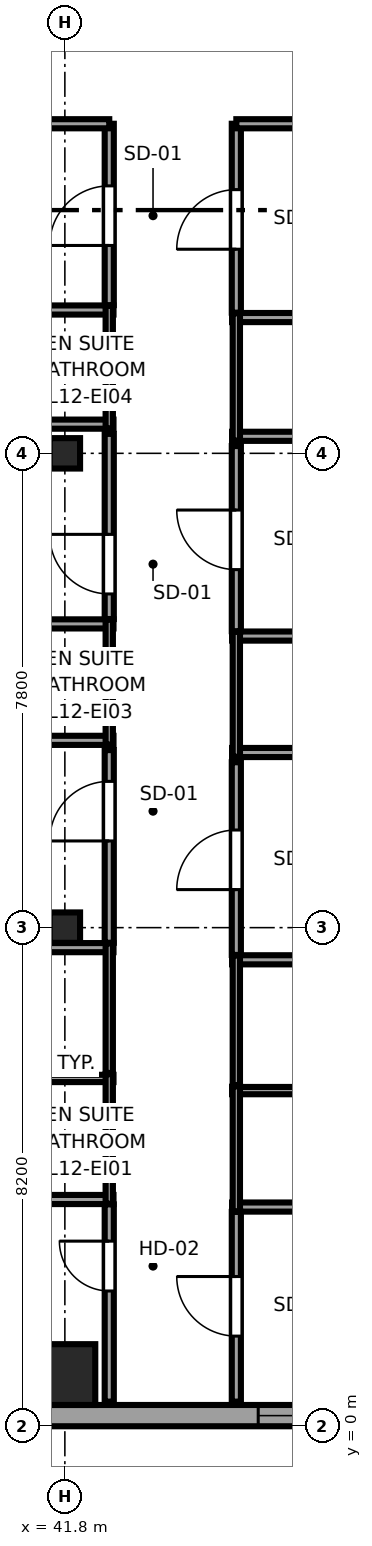
"""IFC4 building model, lengths in metres.
Left out: names, types, materials, properties, quantities, classifications, styles, units other than length and angle.
Written with IfcOpenShell. Run it as: python <this file> out.ifc"""

import sys

from ifc_helpers import new_model, si_unit, direction, frame, frame_2d, origin, origin_2d, place, context, subcontext, project, spatial, rectangle, i_section, extrude, source, transform, mapped, element, fill, save


model = new_model("IFC4")
c1 = context("Model", 3, precision=1e-05, world=origin(), true_north=direction((0.0, 1.0)))
c2 = subcontext(c1, "Body", "Model", "MODEL_VIEW")
j1 = project(units=[si_unit("LENGTHUNIT", "METRE"), si_unit("PLANEANGLEUNIT", "RADIAN")], contexts=[c1])
p1 = place(None, origin())
s1 = spatial("IfcSite", under=j1, at=p1, CompositionType="ELEMENT")
p2 = place(p1, origin())
s2 = spatial("IfcBuilding", under=s1, at=p2, CompositionType="ELEMENT")
p3 = place(p2, frame((0.0, 0.0, 53.3)))
s3 = spatial("IfcBuildingStorey", under=s2, at=p3, CompositionType="ELEMENT", Elevation=53.3)
m1 = source(origin(), c2, "Body", "SweptSolid", [
    extrude(rectangle(XDim=1.0, YDim=1.0, at=origin_2d()), origin(), (0.0, 0.0, 1.0), 3.55),
])
p4 = place(p3, frame((41.8, 0.85, 0.0), z_axis=(0.0, 0.0, 1.0), x_axis=(1.0, 0.0, 0.0)))
e1 = element("IfcColumn", 1, at=p4, inside=s3, PredefinedType="COLUMN", context=c2, shape_type="MappedRepresentation", body=[
    mapped(m1, transform((0.0, 0.0, 0.0), x_axis=(1.0, 0.0, 0.0), y_axis=(0.0, 1.0, 0.0), z_axis=(0.0, 0.0, 1.0), scale=1.0)),
])
m2 = source(origin(), c2, "Body", "SweptSolid", [
    extrude(i_section(OverallWidth=0.5, OverallDepth=0.5, WebThickness=0.028, FlangeThickness=0.045, at=origin_2d()), origin(), (0.0, 0.0, 1.0), 3.55),
])
for number, where, z_axis, x_axis in (
    (2, (41.8, 8.2, 0.0), (0.0, 0.0, 1.0), (1.0, 0.0, 0.0)),
    (3, (41.8, 16.0, 0.0), (0.0, 0.0, 1.0), (1.0, 0.0, 0.0)),
):
    element("IfcColumn", number, at=place(p3, frame(where, z_axis=z_axis, x_axis=x_axis)), inside=s3, PredefinedType="COLUMN", context=c2, shape_type="MappedRepresentation", body=[
        mapped(m2, transform((0.0, 0.0, 0.0), x_axis=(1.0, 0.0, 0.0), y_axis=(0.0, 1.0, 0.0), z_axis=(0.0, 0.0, 1.0), scale=1.0)),
    ])
p5 = place(p3, frame((34.375, 0.175, 0.0), z_axis=(0.0, 0.0, 1.0), x_axis=(1.0, 0.0, 0.0)))
e4 = element("IfcWall", 4, at=p5, inside=s3, PredefinedType="SOLIDWALL", context=c2, shape_type="SweptSolid", body=[
    extrude(rectangle(XDim=18.008, YDim=0.35, at=frame_2d((9.004, 0.0))), origin(), (0.0, 0.0, 1.0), 3.37),
])
p6 = place(p5, frame((1.651, 0.0, 0.68)))
e5 = element("IfcOpeningElement", 5, at=p6, cuts=e4, PredefinedType="OPENING", context=c2, shape_type="SweptSolid", body=[
    extrude(rectangle(XDim=2.1, YDim=1.9, at=frame_2d((1.05, 0.95))), frame((0.0, 0.185, 0.0), z_axis=(0.0, -1.0, 0.0), x_axis=(1.0, 0.0, 0.0)), (0.0, 0.0, 1.0), 0.37),
])
p7 = place(p5, frame((10.605, 0.0, 0.68)))
e6 = element("IfcOpeningElement", 6, at=p7, cuts=e4, PredefinedType="OPENING", context=c2, shape_type="SweptSolid", body=[
    extrude(rectangle(XDim=2.1, YDim=1.9, at=frame_2d((1.05, 0.95))), frame((0.0, 0.185, 0.0), z_axis=(0.0, -1.0, 0.0), x_axis=(1.0, 0.0, 0.0)), (0.0, 0.0, 1.0), 0.37),
])
p8 = place(p3, frame((40.01, 3.729, 0.0), z_axis=(0.0, 0.0, 1.0), x_axis=(1.0, 0.0, 0.0)))
e7 = element("IfcWall", 7, at=p8, inside=s3, PredefinedType="PARTITIONING", context=c2, shape_type="SweptSolid", body=[
    extrude(rectangle(XDim=2.59, YDim=0.15, at=frame_2d((1.295, 0.0))), origin(), (0.0, 0.0, 1.0), 3.37),
])
p9 = place(p3, frame((40.01, 5.72, 0.0), z_axis=(0.0, 0.0, 1.0), x_axis=(1.0, 0.0, 0.0)))
e8 = element("IfcWall", 8, at=p9, inside=s3, PredefinedType="PLUMBINGWALL", context=c2, shape_type="SweptSolid", body=[
    extrude(rectangle(XDim=2.59, YDim=0.12, at=frame_2d((1.295, 0.0))), origin(), (0.0, 0.0, 1.0), 3.37),
])
p10 = place(p3, frame((42.53, 3.659, 0.0), z_axis=(0.0, 0.0, 1.0), x_axis=(0.0, 1.0, 0.0)))
e9 = element("IfcWall", 9, at=p10, inside=s3, PredefinedType="PLUMBINGWALL", context=c2, shape_type="SweptSolid", body=[
    extrude(rectangle(XDim=2.131, YDim=0.12, at=frame_2d((1.065, 0.0))), origin(), (0.0, 0.0, 1.0), 3.37),
])
p11 = place(p3, frame((40.01, 7.871, 0.0), z_axis=(0.0, 0.0, 1.0), x_axis=(1.0, 0.0, 0.0)))
e10 = element("IfcWall", 10, at=p11, inside=s3, PredefinedType="PARTITIONING", context=c2, shape_type="SweptSolid", body=[
    extrude(rectangle(XDim=2.59, YDim=0.15, at=frame_2d((1.295, 0.0))), origin(), (0.0, 0.0, 1.0), 3.37),
])
p12 = place(p3, frame((42.53, 5.81, 0.0), z_axis=(0.0, 0.0, 1.0), x_axis=(0.0, 1.0, 0.0)))
e11 = element("IfcWall", 11, at=p12, inside=s3, PredefinedType="PLUMBINGWALL", context=c2, shape_type="SweptSolid", body=[
    extrude(rectangle(XDim=2.131, YDim=0.12, at=frame_2d((1.065, 0.0))), origin(), (0.0, 0.0, 1.0), 3.37),
])
p13 = place(p3, frame((34.65, 11.28, 0.0), z_axis=(0.0, 0.0, 1.0), x_axis=(1.0, 0.0, 0.0)))
e12 = element("IfcWall", 12, at=p13, inside=s3, PredefinedType="PARTITIONING", context=c2, shape_type="SweptSolid", body=[
    extrude(rectangle(XDim=7.95, YDim=0.15, at=frame_2d((3.975, 0.0))), origin(), (0.0, 0.0, 1.0), 3.37),
])
p14 = place(p3, frame((40.01, 13.195, 0.0), z_axis=(0.0, 0.0, 1.0), x_axis=(1.0, 0.0, 0.0)))
e13 = element("IfcWall", 13, at=p14, inside=s3, PredefinedType="PARTITIONING", context=c2, shape_type="SweptSolid", body=[
    extrude(rectangle(XDim=2.59, YDim=0.15, at=frame_2d((1.295, 0.0))), origin(), (0.0, 0.0, 1.0), 3.37),
])
p15 = place(p3, frame((42.53, 11.21, 0.0), z_axis=(0.0, 0.0, 1.0), x_axis=(0.0, 1.0, 0.0)))
e14 = element("IfcWall", 14, at=p15, inside=s3, PredefinedType="PLUMBINGWALL", context=c2, shape_type="SweptSolid", body=[
    extrude(rectangle(XDim=2.055, YDim=0.12, at=frame_2d((1.027, 0.0))), origin(), (0.0, 0.0, 1.0), 3.37),
])
p16 = place(p3, frame((34.65, 16.48, 0.0), z_axis=(0.0, 0.0, 1.0), x_axis=(1.0, 0.0, 0.0)))
e15 = element("IfcWall", 15, at=p16, inside=s3, PredefinedType="PARTITIONING", context=c2, shape_type="SweptSolid", body=[
    extrude(rectangle(XDim=7.95, YDim=0.15, at=frame_2d((3.975, 0.0))), origin(), (0.0, 0.0, 1.0), 3.37),
])
p17 = place(p3, frame((40.01, 18.357, 0.0), z_axis=(0.0, 0.0, 1.0), x_axis=(1.0, 0.0, 0.0)))
e16 = element("IfcWall", 16, at=p17, inside=s3, PredefinedType="PARTITIONING", context=c2, shape_type="SweptSolid", body=[
    extrude(rectangle(XDim=2.59, YDim=0.15, at=frame_2d((1.295, 0.0))), origin(), (0.0, 0.0, 1.0), 3.37),
])
p18 = place(p3, frame((42.53, 16.41, 0.0), z_axis=(0.0, 0.0, 1.0), x_axis=(0.0, 1.0, 0.0)))
e17 = element("IfcWall", 17, at=p18, inside=s3, PredefinedType="PLUMBINGWALL", context=c2, shape_type="SweptSolid", body=[
    extrude(rectangle(XDim=2.017, YDim=0.12, at=frame_2d((1.009, 0.0))), origin(), (0.0, 0.0, 1.0), 3.37),
])
p19 = place(p3, frame((44.55, 3.605, 0.0), z_axis=(0.0, 0.0, 1.0), x_axis=(1.0, 0.0, 0.0)))
e18 = element("IfcWall", 18, at=p19, inside=s3, PredefinedType="PARTITIONING", context=c2, shape_type="SweptSolid", body=[
    extrude(rectangle(XDim=2.59, YDim=0.15, at=frame_2d((1.295, 0.0))), origin(), (0.0, 0.0, 1.0), 3.37),
])
p20 = place(p3, frame((44.55, 5.52, 0.0), z_axis=(0.0, 0.0, 1.0), x_axis=(1.0, 0.0, 0.0)))
e19 = element("IfcWall", 19, at=p20, inside=s3, PredefinedType="PLUMBINGWALL", context=c2, shape_type="SweptSolid", body=[
    extrude(rectangle(XDim=2.59, YDim=0.12, at=frame_2d((1.295, 0.0))), origin(), (0.0, 0.0, 1.0), 3.37),
])
p21 = place(p3, frame((44.62, 3.535, 0.0), z_axis=(0.0, 0.0, 1.0), x_axis=(0.0, 1.0, 0.0)))
e20 = element("IfcWall", 20, at=p21, inside=s3, PredefinedType="PLUMBINGWALL", context=c2, shape_type="SweptSolid", body=[
    extrude(rectangle(XDim=2.055, YDim=0.12, at=frame_2d((1.028, 0.0))), origin(), (0.0, 0.0, 1.0), 3.37),
])
p22 = place(p3, frame((44.55, 7.671, 0.0), z_axis=(0.0, 0.0, 1.0), x_axis=(1.0, 0.0, 0.0)))
e21 = element("IfcWall", 21, at=p22, inside=s3, PredefinedType="PARTITIONING", context=c2, shape_type="SweptSolid", body=[
    extrude(rectangle(XDim=2.59, YDim=0.15, at=frame_2d((1.295, 0.0))), origin(), (0.0, 0.0, 1.0), 3.37),
])
p23 = place(p3, frame((44.62, 5.61, 0.0), z_axis=(0.0, 0.0, 1.0), x_axis=(0.0, 1.0, 0.0)))
e22 = element("IfcWall", 22, at=p23, inside=s3, PredefinedType="PLUMBINGWALL", context=c2, shape_type="SweptSolid", body=[
    extrude(rectangle(XDim=2.131, YDim=0.12, at=frame_2d((1.065, 0.0))), origin(), (0.0, 0.0, 1.0), 3.37),
])
p24 = place(p3, frame((44.55, 11.08, 0.0), z_axis=(0.0, 0.0, 1.0), x_axis=(1.0, 0.0, 0.0)))
e23 = element("IfcWall", 23, at=p24, inside=s3, PredefinedType="PARTITIONING", context=c2, shape_type="SweptSolid", body=[
    extrude(rectangle(XDim=12.045, YDim=0.15, at=frame_2d((6.022, 0.0))), origin(), (0.0, 0.0, 1.0), 3.37),
])
p25 = place(p3, frame((44.55, 12.995, 0.0), z_axis=(0.0, 0.0, 1.0), x_axis=(1.0, 0.0, 0.0)))
e24 = element("IfcWall", 24, at=p25, inside=s3, PredefinedType="PARTITIONING", context=c2, shape_type="SweptSolid", body=[
    extrude(rectangle(XDim=2.59, YDim=0.15, at=frame_2d((1.295, 0.0))), origin(), (0.0, 0.0, 1.0), 3.37),
])
p26 = place(p3, frame((44.62, 11.01, 0.0), z_axis=(0.0, 0.0, 1.0), x_axis=(0.0, 1.0, 0.0)))
e25 = element("IfcWall", 25, at=p26, inside=s3, PredefinedType="PLUMBINGWALL", context=c2, shape_type="SweptSolid", body=[
    extrude(rectangle(XDim=2.055, YDim=0.12, at=frame_2d((1.027, 0.0))), origin(), (0.0, 0.0, 1.0), 3.37),
])
p27 = place(p3, frame((44.55, 16.28, 0.0), z_axis=(0.0, 0.0, 1.0), x_axis=(1.0, 0.0, 0.0)))
e26 = element("IfcWall", 26, at=p27, inside=s3, PredefinedType="PARTITIONING", context=c2, shape_type="SweptSolid", body=[
    extrude(rectangle(XDim=12.045, YDim=0.15, at=frame_2d((6.022, 0.0))), origin(), (0.0, 0.0, 1.0), 3.37),
])
p28 = place(p3, frame((44.55, 18.233, 0.0), z_axis=(0.0, 0.0, 1.0), x_axis=(1.0, 0.0, 0.0)))
e27 = element("IfcWall", 27, at=p28, inside=s3, PredefinedType="PARTITIONING", context=c2, shape_type="SweptSolid", body=[
    extrude(rectangle(XDim=2.59, YDim=0.15, at=frame_2d((1.295, 0.0))), origin(), (0.0, 0.0, 1.0), 3.37),
])
p29 = place(p3, frame((44.62, 16.21, 0.0), z_axis=(0.0, 0.0, 1.0), x_axis=(0.0, 1.0, 0.0)))
e28 = element("IfcWall", 28, at=p29, inside=s3, PredefinedType="PLUMBINGWALL", context=c2, shape_type="SweptSolid", body=[
    extrude(rectangle(XDim=2.093, YDim=0.12, at=frame_2d((1.046, 0.0))), origin(), (0.0, 0.0, 1.0), 3.37),
])
p30 = place(p3, frame((42.53, 0.405, 0.0), z_axis=(0.0, 0.0, 1.0), x_axis=(0.0, 1.0, 0.0)))
e29 = element("IfcWall", 29, at=p30, inside=s3, PredefinedType="PARTITIONING", context=c2, shape_type="SweptSolid", body=[
    extrude(rectangle(XDim=3.244, YDim=0.15, at=frame_2d((1.622, 0.0))), origin(), (0.0, 0.0, 1.0), 3.37),
])
p31 = place(p30, frame((1.82, 0.0, 0.0)))
e30 = element("IfcOpeningElement", 30, at=p31, cuts=e29, PredefinedType="OPENING", context=c2, shape_type="SweptSolid", body=[
    extrude(rectangle(XDim=0.82, YDim=2.01, at=frame_2d((0.41, 1.005))), frame((0.0, 0.085, 0.0), z_axis=(0.0, -1.0, 0.0), x_axis=(1.0, 0.0, 0.0)), (0.0, 0.0, 1.0), 0.17),
])
p32 = place(p3, frame((42.53, 7.951, 0.0), z_axis=(0.0, 0.0, 1.0), x_axis=(0.0, 1.0, 0.0)))
e31 = element("IfcWall", 31, at=p32, inside=s3, PredefinedType="PARTITIONING", context=c2, shape_type="SweptSolid", body=[
    extrude(rectangle(XDim=3.169, YDim=0.15, at=frame_2d((1.584, 0.0))), origin(), (0.0, 0.0, 1.0), 3.37),
])
p33 = place(p32, frame((1.675, 0.0, 0.0)))
e32 = element("IfcOpeningElement", 32, at=p33, cuts=e31, PredefinedType="OPENING", context=c2, shape_type="SweptSolid", body=[
    extrude(rectangle(XDim=0.98, YDim=2.12, at=frame_2d((0.49, 1.06))), frame((0.0, 0.085, 0.0), z_axis=(0.0, -1.0, 0.0), x_axis=(1.0, 0.0, 0.0)), (0.0, 0.0, 1.0), 0.17),
])
p34 = place(p3, frame((42.53, 13.275, 0.0), z_axis=(0.0, 0.0, 1.0), x_axis=(0.0, 1.0, 0.0)))
e33 = element("IfcWall", 33, at=p34, inside=s3, PredefinedType="PARTITIONING", context=c2, shape_type="SweptSolid", body=[
    extrude(rectangle(XDim=3.045, YDim=0.15, at=frame_2d((1.522, 0.0))), origin(), (0.0, 0.0, 1.0), 3.37),
])
p35 = place(p34, frame((0.413, 0.0, 0.0)))
e34 = element("IfcOpeningElement", 34, at=p35, cuts=e33, PredefinedType="OPENING", context=c2, shape_type="SweptSolid", body=[
    extrude(rectangle(XDim=0.98, YDim=2.12, at=frame_2d((0.49, 1.06))), frame((0.0, 0.085, 0.0), z_axis=(0.0, -1.0, 0.0), x_axis=(1.0, 0.0, 0.0)), (0.0, 0.0, 1.0), 0.17),
])
p36 = place(p3, frame((42.53, 18.437, 0.0), z_axis=(0.0, 0.0, 1.0), x_axis=(0.0, 1.0, 0.0)))
e35 = element("IfcWall", 35, at=p36, inside=s3, PredefinedType="PARTITIONING", context=c2, shape_type="SweptSolid", body=[
    extrude(rectangle(XDim=2.983, YDim=0.15, at=frame_2d((1.491, 0.0))), origin(), (0.0, 0.0, 1.0), 3.37),
])
p37 = place(p36, frame((0.981, 0.0, 0.0)))
e36 = element("IfcOpeningElement", 36, at=p37, cuts=e35, PredefinedType="OPENING", context=c2, shape_type="SweptSolid", body=[
    extrude(rectangle(XDim=0.98, YDim=2.12, at=frame_2d((0.49, 1.06))), frame((0.0, 0.085, 0.0), z_axis=(0.0, -1.0, 0.0), x_axis=(1.0, 0.0, 0.0)), (0.0, 0.0, 1.0), 0.17),
])
p38 = place(p3, frame((34.65, 21.42, 0.0), z_axis=(0.0, 0.0, 1.0), x_axis=(1.0, 0.0, 0.0)))
e37 = element("IfcWall", 37, at=p38, inside=s3, PredefinedType="PARTITIONING", context=c2, shape_type="SweptSolid", body=[
    extrude(rectangle(XDim=7.88, YDim=0.15, at=frame_2d((3.94, 0.0))), origin(), (0.0, 0.0, 1.0), 3.37),
])
p39 = place(p3, frame((44.62, 0.405, 0.0), z_axis=(0.0, 0.0, 1.0), x_axis=(0.0, 1.0, 0.0)))
e38 = element("IfcWall", 38, at=p39, inside=s3, PredefinedType="PARTITIONING", context=c2, shape_type="SweptSolid", body=[
    extrude(rectangle(XDim=3.12, YDim=0.15, at=frame_2d((1.56, 0.0))), origin(), (0.0, 0.0, 1.0), 3.37),
])
p40 = place(p39, frame((1.077, 0.0, 0.0)))
e39 = element("IfcOpeningElement", 39, at=p40, cuts=e38, PredefinedType="OPENING", context=c2, shape_type="SweptSolid", body=[
    extrude(rectangle(XDim=0.98, YDim=2.12, at=frame_2d((0.49, 1.06))), frame((0.0, 0.085, 0.0), z_axis=(0.0, -1.0, 0.0), x_axis=(1.0, 0.0, 0.0)), (0.0, 0.0, 1.0), 0.17),
])
p41 = place(p3, frame((44.62, 7.751, 0.0), z_axis=(0.0, 0.0, 1.0), x_axis=(0.0, 1.0, 0.0)))
e40 = element("IfcWall", 40, at=p41, inside=s3, PredefinedType="PARTITIONING", context=c2, shape_type="SweptSolid", body=[
    extrude(rectangle(XDim=3.169, YDim=0.15, at=frame_2d((1.584, 0.0))), origin(), (0.0, 0.0, 1.0), 3.37),
])
p42 = place(p41, frame((1.074, 0.0, 0.0)))
e41 = element("IfcOpeningElement", 41, at=p42, cuts=e40, PredefinedType="OPENING", context=c2, shape_type="SweptSolid", body=[
    extrude(rectangle(XDim=0.98, YDim=2.12, at=frame_2d((0.49, 1.06))), frame((0.0, 0.085, 0.0), z_axis=(0.0, -1.0, 0.0), x_axis=(1.0, 0.0, 0.0)), (0.0, 0.0, 1.0), 0.17),
])
p43 = place(p3, frame((44.62, 13.075, 0.0), z_axis=(0.0, 0.0, 1.0), x_axis=(0.0, 1.0, 0.0)))
e42 = element("IfcWall", 42, at=p43, inside=s3, PredefinedType="PARTITIONING", context=c2, shape_type="SweptSolid", body=[
    extrude(rectangle(XDim=3.045, YDim=0.15, at=frame_2d((1.522, 0.0))), origin(), (0.0, 0.0, 1.0), 3.37),
])
p44 = place(p43, frame((1.012, 0.0, 0.0)))
e43 = element("IfcOpeningElement", 43, at=p44, cuts=e42, PredefinedType="OPENING", context=c2, shape_type="SweptSolid", body=[
    extrude(rectangle(XDim=0.98, YDim=2.12, at=frame_2d((0.49, 1.06))), frame((0.0, 0.085, 0.0), z_axis=(0.0, -1.0, 0.0), x_axis=(1.0, 0.0, 0.0)), (0.0, 0.0, 1.0), 0.17),
])
p45 = place(p3, frame((44.62, 18.313, 0.0), z_axis=(0.0, 0.0, 1.0), x_axis=(0.0, 1.0, 0.0)))
e44 = element("IfcWall", 44, at=p45, inside=s3, PredefinedType="PARTITIONING", context=c2, shape_type="SweptSolid", body=[
    extrude(rectangle(XDim=3.107, YDim=0.15, at=frame_2d((1.553, 0.0))), origin(), (0.0, 0.0, 1.0), 3.37),
])
p46 = place(p45, frame((1.043, 0.0, 0.0)))
e45 = element("IfcOpeningElement", 45, at=p46, cuts=e44, PredefinedType="OPENING", context=c2, shape_type="SweptSolid", body=[
    extrude(rectangle(XDim=0.98, YDim=2.12, at=frame_2d((0.49, 1.06))), frame((0.0, 0.085, 0.0), z_axis=(0.0, -1.0, 0.0), x_axis=(1.0, 0.0, 0.0)), (0.0, 0.0, 1.0), 0.17),
])
p47 = place(p3, frame((44.62, 21.42, 0.0), z_axis=(0.0, 0.0, 1.0), x_axis=(1.0, 0.0, 0.0)))
e46 = element("IfcWall", 46, at=p47, inside=s3, PredefinedType="PARTITIONING", context=c2, shape_type="SweptSolid", body=[
    extrude(rectangle(XDim=11.975, YDim=0.15, at=frame_2d((5.987, 0.0))), origin(), (0.0, 0.0, 1.0), 3.37),
])
m3 = source(origin(), c2, "Body", "SweptSolid", [
    extrude(rectangle(XDim=2.1, YDim=1.9, at=frame_2d((1.05, 0.95))), frame((0.0, 0.09, 0.0), z_axis=(0.0, -1.0, 0.0), x_axis=(1.0, 0.0, 0.0)), (0.0, 0.0, 1.0), 0.06),
])
p48 = place(p7, origin())
e47 = element("IfcWindow", 47, at=p48, inside=s3, PartitioningType="TRIPLE_PANEL_HORIZONTAL", PredefinedType="WINDOW", context=c2, shape_type="MappedRepresentation", body=[
    mapped(m3, transform((0.0, 0.0, 0.0), x_axis=(1.0, 0.0, 0.0), y_axis=(0.0, 1.0, 0.0), z_axis=(0.0, 0.0, 1.0), scale=1.0)),
])
fill(e6, e47)
m4 = source(origin(), c2, "Body", "SweptSolid", [
    extrude(rectangle(XDim=0.82, YDim=2.01, at=frame_2d((0.41, 1.005))), frame((0.0, 0.025, 0.0), z_axis=(0.0, -1.0, 0.0), x_axis=(1.0, 0.0, 0.0)), (0.0, 0.0, 1.0), 0.05),
])
p49 = place(p31, origin())
e48 = element("IfcDoor", 48, at=p49, inside=s3, OperationType="SINGLE_SWING_RIGHT", PredefinedType="DOOR", context=c2, shape_type="MappedRepresentation", body=[
    mapped(m4, transform((0.0, 0.0, 0.0), x_axis=(1.0, 0.0, 0.0), y_axis=(0.0, 1.0, 0.0), z_axis=(0.0, 0.0, 1.0), scale=1.0)),
])
fill(e30, e48)
m5 = source(origin(), c2, "Body", "SweptSolid", [
    extrude(rectangle(XDim=0.98, YDim=2.12, at=frame_2d((0.49, 1.06))), frame((0.0, 0.025, 0.0), z_axis=(0.0, -1.0, 0.0), x_axis=(1.0, 0.0, 0.0)), (0.0, 0.0, 1.0), 0.05),
])
p50 = place(p33, origin())
e49 = element("IfcDoor", 49, at=p50, inside=s3, OperationType="SINGLE_SWING_LEFT", PredefinedType="DOOR", context=c2, shape_type="MappedRepresentation", body=[
    mapped(m5, transform((0.0, 0.0, 0.0), x_axis=(1.0, 0.0, 0.0), y_axis=(0.0, 1.0, 0.0), z_axis=(0.0, 0.0, 1.0), scale=1.0)),
])
fill(e32, e49)
p51 = place(p35, origin())
e50 = element("IfcDoor", 50, at=p51, inside=s3, OperationType="SINGLE_SWING_RIGHT", PredefinedType="DOOR", context=c2, shape_type="MappedRepresentation", body=[
    mapped(m5, transform((0.0, 0.0, 0.0), x_axis=(1.0, 0.0, 0.0), y_axis=(0.0, 1.0, 0.0), z_axis=(0.0, 0.0, 1.0), scale=1.0)),
])
fill(e34, e50)
p52 = place(p37, origin())
e51 = element("IfcDoor", 51, at=p52, inside=s3, OperationType="SINGLE_SWING_LEFT", PredefinedType="DOOR", context=c2, shape_type="MappedRepresentation", body=[
    mapped(m5, transform((0.0, 0.0, 0.0), x_axis=(1.0, 0.0, 0.0), y_axis=(0.0, 1.0, 0.0), z_axis=(0.0, 0.0, 1.0), scale=1.0)),
])
fill(e36, e51)
p53 = place(p40, origin())
e52 = element("IfcDoor", 52, at=p53, inside=s3, OperationType="SINGLE_SWING_RIGHT", PredefinedType="DOOR", context=c2, shape_type="MappedRepresentation", body=[
    mapped(m5, transform((0.0, 0.0, 0.0), x_axis=(1.0, 0.0, 0.0), y_axis=(0.0, 1.0, 0.0), z_axis=(0.0, 0.0, 1.0), scale=1.0)),
])
fill(e39, e52)
p54 = place(p42, origin())
e53 = element("IfcDoor", 53, at=p54, inside=s3, OperationType="SINGLE_SWING_LEFT", PredefinedType="DOOR", context=c2, shape_type="MappedRepresentation", body=[
    mapped(m5, transform((0.0, 0.0, 0.0), x_axis=(1.0, 0.0, 0.0), y_axis=(0.0, 1.0, 0.0), z_axis=(0.0, 0.0, 1.0), scale=1.0)),
])
fill(e41, e53)
p55 = place(p44, origin())
e54 = element("IfcDoor", 54, at=p55, inside=s3, OperationType="SINGLE_SWING_RIGHT", PredefinedType="DOOR", context=c2, shape_type="MappedRepresentation", body=[
    mapped(m5, transform((0.0, 0.0, 0.0), x_axis=(1.0, 0.0, 0.0), y_axis=(0.0, 1.0, 0.0), z_axis=(0.0, 0.0, 1.0), scale=1.0)),
])
fill(e43, e54)
p56 = place(p46, origin())
e55 = element("IfcDoor", 55, at=p56, inside=s3, OperationType="SINGLE_SWING_LEFT", PredefinedType="DOOR", context=c2, shape_type="MappedRepresentation", body=[
    mapped(m5, transform((0.0, 0.0, 0.0), x_axis=(1.0, 0.0, 0.0), y_axis=(0.0, 1.0, 0.0), z_axis=(0.0, 0.0, 1.0), scale=1.0)),
])
fill(e45, e55)
save(model, sys.argv[1])
